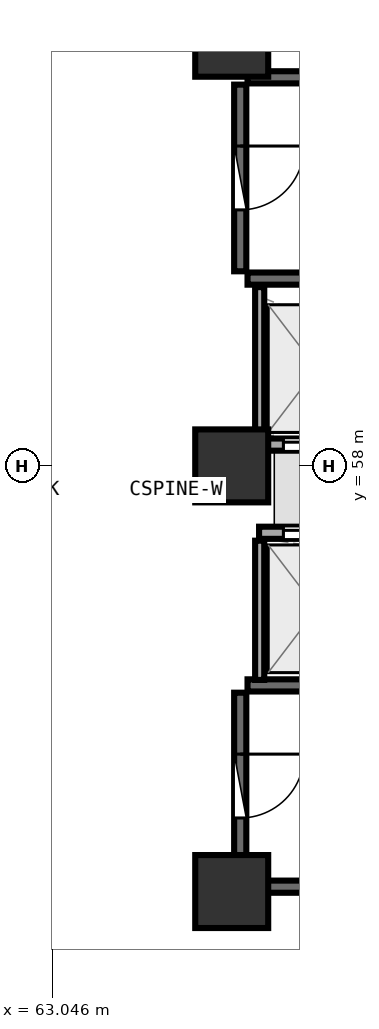
"""IFC4 building model, lengths in metres.
Left out: names, types, materials, properties, quantities, classifications, styles, units other than length and angle.
Written with IfcOpenShell. Run it as: python <this file> out.ifc"""

import sys

from ifc_helpers import new_model, si_unit, direction, frame, frame_2d, origin, origin_2d, place, context, subcontext, project, spatial, rectangle, extrude, element, fill, save


model = new_model("IFC4")
c1 = context("Model", 3, precision=1e-05, world=origin(), true_north=direction((0.0, 1.0)))
c2 = subcontext(c1, "Body", "Model", "MODEL_VIEW")
j1 = project(units=[si_unit("LENGTHUNIT", "METRE"), si_unit("PLANEANGLEUNIT", "RADIAN")], contexts=[c1])
p1 = place(None, origin())
s1 = spatial("IfcSite", under=j1, at=p1, CompositionType="ELEMENT")
p2 = place(p1, origin())
s2 = spatial("IfcBuilding", under=s1, at=p2, CompositionType="ELEMENT")
p3 = place(p2, frame((0.0, 0.0, 125.1)))
s3 = spatial("IfcBuildingStorey", under=s2, at=p3, CompositionType="ELEMENT", Elevation=125.1)
for number, where, z_axis, x_axis in (
    (1, (66.0, 51.0, 0.0), (0.0, 0.0, 1.0), (1.0, 0.0, 0.0)),
    (2, (66.0, 65.0, 0.0), (0.0, 0.0, 1.0), (1.0, 0.0, 0.0)),
    (3, (66.0, 58.0, 0.0), (0.0, 0.0, 1.0), (1.0, 0.0, 0.0)),
):
    element("IfcColumn", number, at=place(p3, frame(where, z_axis=z_axis, x_axis=x_axis)), inside=s3, PredefinedType="PILASTER", context=c2, shape_type="SweptSolid", body=[
        extrude(rectangle(XDim=1.2, YDim=1.2, at=origin_2d()), origin(), (0.0, 0.0, 1.0), 4.76),
    ])
for number, where, z_axis, x_axis in (
    (4, (66.26, 61.08, 0.0), (0.0, 0.0, 1.0), (1.0, 0.0, 0.0)),
    (5, (73.42, 64.39, 0.0), (0.0, 0.0, 1.0), (-1.0, 0.0, 0.0)),
):
    element("IfcWall", number, at=place(p3, frame(where, z_axis=z_axis, x_axis=x_axis)), inside=s3, PredefinedType="SHEAR", context=c2, shape_type="SweptSolid", body=[
        extrude(rectangle(XDim=7.16, YDim=0.2, at=frame_2d((3.58, 0.0))), origin(), (0.0, 0.0, 1.0), 4.36),
    ])
p4 = place(p3, frame((66.14, 64.27, 0.0), z_axis=(0.0, 0.0, 1.0), x_axis=(0.0, -1.0, 0.0)))
e6 = element("IfcWall", 6, at=p4, inside=s3, PredefinedType="SHEAR", context=c2, shape_type="SweptSolid", body=[
    extrude(rectangle(XDim=3.07, YDim=0.2, at=frame_2d((1.535, 0.0))), origin(), (0.0, 0.0, 1.0), 4.36),
])
p5 = place(p4, frame((1.01, 0.0, 0.0)))
e7 = element("IfcOpeningElement", 7, at=p5, cuts=e6, PredefinedType="OPENING", context=c2, shape_type="SweptSolid", body=[
    extrude(rectangle(XDim=1.05, YDim=2.1, at=frame_2d((0.525, 1.05))), frame((0.0, 0.11, 0.0), z_axis=(0.0, -1.0, 0.0), x_axis=(1.0, 0.0, 0.0)), (0.0, 0.0, 1.0), 0.22),
])
for number, where, z_axis, x_axis in (
    (8, (66.26, 51.08, 0.0), (0.0, 0.0, 1.0), (1.0, 0.0, 0.0)),
    (9, (73.42, 54.39, 0.0), (0.0, 0.0, 1.0), (-1.0, 0.0, 0.0)),
):
    element("IfcWall", number, at=place(p3, frame(where, z_axis=z_axis, x_axis=x_axis)), inside=s3, PredefinedType="SHEAR", context=c2, shape_type="SweptSolid", body=[
        extrude(rectangle(XDim=7.16, YDim=0.2, at=frame_2d((3.58, 0.0))), origin(), (0.0, 0.0, 1.0), 4.36),
    ])
p6 = place(p3, frame((66.14, 54.27, 0.0), z_axis=(0.0, 0.0, 1.0), x_axis=(0.0, -1.0, 0.0)))
e10 = element("IfcWall", 10, at=p6, inside=s3, PredefinedType="SHEAR", context=c2, shape_type="SweptSolid", body=[
    extrude(rectangle(XDim=3.07, YDim=0.2, at=frame_2d((1.535, 0.0))), origin(), (0.0, 0.0, 1.0), 4.36),
])
p7 = place(p6, frame((1.01, 0.0, 0.0)))
e11 = element("IfcOpeningElement", 11, at=p7, cuts=e10, PredefinedType="OPENING", context=c2, shape_type="SweptSolid", body=[
    extrude(rectangle(XDim=1.05, YDim=2.1, at=frame_2d((0.525, 1.05))), frame((0.0, 0.11, 0.0), z_axis=(0.0, -1.0, 0.0), x_axis=(1.0, 0.0, 0.0)), (0.0, 0.0, 1.0), 0.22),
])
p8 = place(p3, frame((66.45, 58.35, 0.0), z_axis=(0.0, 0.0, 1.0), x_axis=(1.0, 0.0, 0.0)))
e12 = element("IfcWall", 12, at=p8, inside=s3, PredefinedType="SOLIDWALL", context=c2, shape_type="SweptSolid", body=[
    extrude(rectangle(XDim=6.0, YDim=0.2, at=frame_2d((3.0, 0.0))), origin(), (0.0, 0.0, 1.0), 4.35),
])
p9 = place(p8, frame((0.4, 0.0, 0.0)))
e13 = element("IfcOpeningElement", 13, at=p9, cuts=e12, PredefinedType="OPENING", context=c2, shape_type="SweptSolid", body=[
    extrude(rectangle(XDim=1.1, YDim=2.1, at=frame_2d((0.55, 1.05))), frame((0.0, 0.11, 0.0), z_axis=(0.0, -1.0, 0.0), x_axis=(1.0, 0.0, 0.0)), (0.0, 0.0, 1.0), 0.22),
])
p10 = place(p8, frame((2.4, 0.0, 0.0)))
e14 = element("IfcOpeningElement", 14, at=p10, cuts=e12, PredefinedType="OPENING", context=c2, shape_type="SweptSolid", body=[
    extrude(rectangle(XDim=1.1, YDim=2.1, at=frame_2d((0.55, 1.05))), frame((0.0, 0.11, 0.0), z_axis=(0.0, -1.0, 0.0), x_axis=(1.0, 0.0, 0.0)), (0.0, 0.0, 1.0), 0.22),
])
p11 = place(p8, frame((4.4, 0.0, 0.0)))
e15 = element("IfcOpeningElement", 15, at=p11, cuts=e12, PredefinedType="OPENING", context=c2, shape_type="SweptSolid", body=[
    extrude(rectangle(XDim=1.1, YDim=2.1, at=frame_2d((0.55, 1.05))), frame((0.0, 0.11, 0.0), z_axis=(0.0, -1.0, 0.0), x_axis=(1.0, 0.0, 0.0)), (0.0, 0.0, 1.0), 0.22),
])
p12 = place(p3, frame((66.46, 58.48, 0.0), z_axis=(0.0, 0.0, 1.0), x_axis=(0.0, 1.0, 0.0)))
e16 = element("IfcWall", 16, at=p12, inside=s3, PredefinedType="PARTITIONING", context=c2, shape_type="SweptSolid", body=[
    extrude(rectangle(XDim=2.46, YDim=0.15, at=frame_2d((1.23, 0.0))), origin(), (0.0, 0.0, 1.0), 4.35),
])
p13 = place(p3, frame((66.45, 56.9, 0.0), z_axis=(0.0, 0.0, 1.0), x_axis=(1.0, 0.0, 0.0)))
e17 = element("IfcWall", 17, at=p13, inside=s3, PredefinedType="SOLIDWALL", context=c2, shape_type="SweptSolid", body=[
    extrude(rectangle(XDim=14.4, YDim=0.2, at=frame_2d((7.2, 0.0))), origin(), (0.0, 0.0, 1.0), 4.35),
])
p14 = place(p13, frame((0.4, 0.0, 0.0)))
e18 = element("IfcOpeningElement", 18, at=p14, cuts=e17, PredefinedType="OPENING", context=c2, shape_type="SweptSolid", body=[
    extrude(rectangle(XDim=1.1, YDim=2.1, at=frame_2d((0.55, 1.05))), frame((0.0, 0.11, 0.0), z_axis=(0.0, -1.0, 0.0), x_axis=(1.0, 0.0, 0.0)), (0.0, 0.0, 1.0), 0.22),
])
p15 = place(p13, frame((2.4, 0.0, 0.0)))
e19 = element("IfcOpeningElement", 19, at=p15, cuts=e17, PredefinedType="OPENING", context=c2, shape_type="SweptSolid", body=[
    extrude(rectangle(XDim=1.1, YDim=2.1, at=frame_2d((0.55, 1.05))), frame((0.0, 0.11, 0.0), z_axis=(0.0, -1.0, 0.0), x_axis=(1.0, 0.0, 0.0)), (0.0, 0.0, 1.0), 0.22),
])
p16 = place(p13, frame((4.4, 0.0, 0.0)))
e20 = element("IfcOpeningElement", 20, at=p16, cuts=e17, PredefinedType="OPENING", context=c2, shape_type="SweptSolid", body=[
    extrude(rectangle(XDim=1.1, YDim=2.1, at=frame_2d((0.55, 1.05))), frame((0.0, 0.11, 0.0), z_axis=(0.0, -1.0, 0.0), x_axis=(1.0, 0.0, 0.0)), (0.0, 0.0, 1.0), 0.22),
])
p17 = place(p3, frame((66.46, 54.48, 0.0), z_axis=(0.0, 0.0, 1.0), x_axis=(0.0, 1.0, 0.0)))
e21 = element("IfcWall", 21, at=p17, inside=s3, PredefinedType="PARTITIONING", context=c2, shape_type="SweptSolid", body=[
    extrude(rectangle(XDim=2.29, YDim=0.15, at=frame_2d((1.145, 0.0))), origin(), (0.0, 0.0, 1.0), 4.35),
])
p18 = place(p3, frame((60.754, 51.57, 0.0), z_axis=(0.0, 0.0, 1.0), x_axis=(0.623035378293, -0.78219365722, 0.0)))
e22 = element("IfcWall", 22, at=p18, inside=s3, PredefinedType="PARTITIONING", context=c2, shape_type="SweptSolid", body=[
    extrude(rectangle(XDim=3.771, YDim=0.1, at=frame_2d((1.885, 0.0))), origin(), (0.0, 0.0, 1.0), 2.345),
])
p19 = place(p5, origin())
e23 = element("IfcDoor", 23, at=p19, inside=s3, OperationType="SINGLE_SWING_LEFT", PredefinedType="DOOR", context=c2, shape_type="SweptSolid", body=[
    extrude(rectangle(XDim=1.05, YDim=2.1, at=frame_2d((0.525, 1.05))), frame((0.0, 0.025, 0.0), z_axis=(0.0, -1.0, 0.0), x_axis=(1.0, 0.0, 0.0)), (0.0, 0.0, 1.0), 0.05),
])
fill(e7, e23)
p20 = place(p7, origin())
e24 = element("IfcDoor", 24, at=p20, inside=s3, OperationType="SINGLE_SWING_LEFT", PredefinedType="DOOR", context=c2, shape_type="SweptSolid", body=[
    extrude(rectangle(XDim=1.05, YDim=2.1, at=frame_2d((0.525, 1.05))), frame((0.0, 0.025, 0.0), z_axis=(0.0, -1.0, 0.0), x_axis=(1.0, 0.0, 0.0)), (0.0, 0.0, 1.0), 0.05),
])
fill(e11, e24)
p21 = place(p9, origin())
e25 = element("IfcDoor", 25, at=p21, inside=s3, OperationType="DOUBLE_DOOR_SLIDING", PredefinedType="DOOR", context=c2, shape_type="SweptSolid", body=[
    extrude(rectangle(XDim=1.1, YDim=2.1, at=frame_2d((0.55, 1.05))), frame((0.0, 0.025, 0.0), z_axis=(0.0, -1.0, 0.0), x_axis=(1.0, 0.0, 0.0)), (0.0, 0.0, 1.0), 0.05),
])
fill(e13, e25)
p22 = place(p14, origin())
e26 = element("IfcDoor", 26, at=p22, inside=s3, OperationType="DOUBLE_DOOR_SLIDING", PredefinedType="DOOR", context=c2, shape_type="SweptSolid", body=[
    extrude(rectangle(XDim=1.1, YDim=2.1, at=frame_2d((0.55, 1.05))), frame((0.0, 0.025, 0.0), z_axis=(0.0, -1.0, 0.0), x_axis=(1.0, 0.0, 0.0)), (0.0, 0.0, 1.0), 0.05),
])
fill(e18, e26)
save(model, sys.argv[1])
